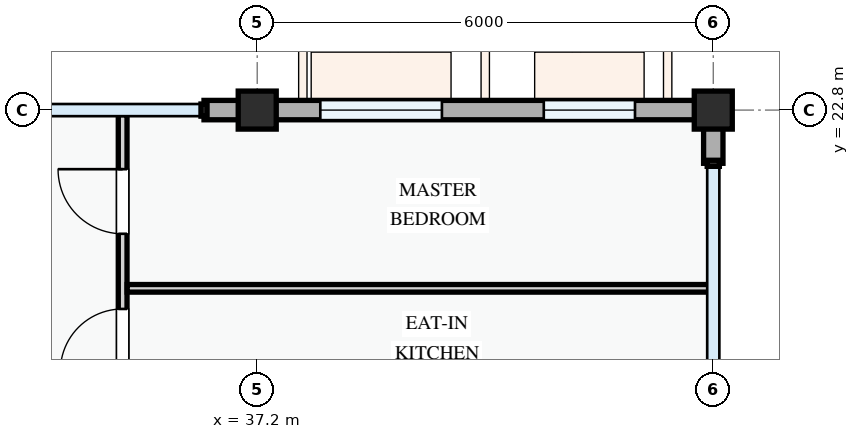
"""IFC4 building model, lengths in metres.
Left out: names, types, materials, properties, quantities, classifications, styles, units other than length and angle.
Written with IfcOpenShell. Run it as: python <this file> out.ifc"""

import sys

from ifc_helpers import new_model, si_unit, direction, frame, frame_2d, origin, origin_2d, place, context, subcontext, project, spatial, rectangle, extrude, element, fill, save


model = new_model("IFC4")
c1 = context("Model", 3, precision=1e-05, world=origin(), true_north=direction((0.0, 1.0)))
c2 = subcontext(c1, "Body", "Model", "MODEL_VIEW")
j1 = project(units=[si_unit("LENGTHUNIT", "METRE"), si_unit("PLANEANGLEUNIT", "RADIAN")], contexts=[c1])
p1 = place(None, origin())
s1 = spatial("IfcSite", under=j1, at=p1, CompositionType="ELEMENT")
p2 = place(p1, origin())
s2 = spatial("IfcBuilding", under=s1, at=p2, CompositionType="ELEMENT")
p3 = place(p2, frame((0.0, 0.0, 31.2)))
s3 = spatial("IfcBuildingStorey", under=s2, at=p3, CompositionType="ELEMENT", Elevation=31.2)
for number, where, z_axis, x_axis in (
    (1, (37.2, 22.8, 0.0), (0.0, 0.0, 1.0), (1.0, 0.0, 0.0)),
    (2, (43.2, 22.8, 0.0), (0.0, 0.0, 1.0), (1.0, 0.0, 0.0)),
):
    element("IfcColumn", number, at=place(p3, frame(where, z_axis=z_axis, x_axis=x_axis)), inside=s3, PredefinedType="COLUMN", context=c2, shape_type="SweptSolid", body=[
        extrude(rectangle(XDim=0.5, YDim=0.5, at=origin_2d()), origin(), (0.0, 0.0, 1.0), 3.3),
    ])
p4 = place(p3, frame((43.2, 22.1, 0.0), z_axis=(0.0, 0.0, 1.0), x_axis=(0.0, 1.0, 0.0)))
e3 = element("IfcWall", 3, at=p4, inside=s3, PredefinedType="STANDARD", context=c2, shape_type="SweptSolid", body=[
    extrude(rectangle(XDim=0.57, YDim=0.255, at=frame_2d((0.285, 0.0))), origin(), (0.0, 0.0, 1.0), 2.425),
])
p5 = place(p3, frame((43.2, 22.8, 0.0), z_axis=(0.0, 0.0, 1.0), x_axis=(-1.0, 0.0, 0.0)))
e4 = element("IfcWall", 4, at=p5, inside=s3, PredefinedType="STANDARD", context=c2, shape_type="SweptSolid", body=[
    extrude(rectangle(XDim=6.0, YDim=0.255, at=frame_2d((3.0, 0.0))), origin(), (0.0, 0.0, 1.0), 2.525),
])
p6 = place(p5, frame((1.03, 0.0, 0.78)))
e5 = element("IfcOpeningElement", 5, at=p6, cuts=e4, PredefinedType="OPENING", context=c2, shape_type="SweptSolid", body=[
    extrude(rectangle(XDim=1.2, YDim=1.5, at=frame_2d((0.6, 0.75))), frame((0.0, 0.137, 0.0), z_axis=(0.0, -1.0, 0.0), x_axis=(1.0, 0.0, 0.0)), (0.0, 0.0, 1.0), 0.275),
])
p7 = place(p5, frame((3.57, 0.0, 0.78)))
e6 = element("IfcOpeningElement", 6, at=p7, cuts=e4, PredefinedType="OPENING", context=c2, shape_type="SweptSolid", body=[
    extrude(rectangle(XDim=1.6, YDim=1.55, at=frame_2d((0.8, 0.775))), frame((0.0, 0.137, 0.0), z_axis=(0.0, -1.0, 0.0), x_axis=(1.0, 0.0, 0.0)), (0.0, 0.0, 1.0), 0.275),
])
p8 = place(p3, frame((37.2, 22.8, 0.0), z_axis=(0.0, 0.0, 1.0), x_axis=(-1.0, 0.0, 0.0)))
e7 = element("IfcWall", 7, at=p8, inside=s3, PredefinedType="STANDARD", context=c2, shape_type="SweptSolid", body=[
    extrude(rectangle(XDim=0.7, YDim=0.255, at=frame_2d((0.35, 0.0))), origin(), (0.0, 0.0, 1.0), 2.375),
])
p9 = place(p3, frame((35.43, 17.98, 0.0), z_axis=(0.0, 0.0, 1.0), x_axis=(0.0, 1.0, 0.0)))
e8 = element("IfcWall", 8, at=p9, inside=s3, PredefinedType="PARTITIONING", context=c2, shape_type="SweptSolid", body=[
    extrude(rectangle(XDim=4.76, YDim=0.115, at=frame_2d((2.38, 0.0))), origin(), (0.0, 0.0, 1.0), 3.0),
])
p10 = place(p9, frame((0.171, 0.0, 0.0)))
e9 = element("IfcOpeningElement", 9, at=p10, cuts=e8, PredefinedType="OPENING", context=c2, shape_type="SweptSolid", body=[
    extrude(rectangle(XDim=0.8, YDim=2.1, at=frame_2d((0.4, 1.05))), frame((0.0, 0.067, 0.0), z_axis=(0.0, -1.0, 0.0), x_axis=(1.0, 0.0, 0.0)), (0.0, 0.0, 1.0), 0.135),
])
p11 = place(p9, frame((1.384, 0.0, 0.0)))
e10 = element("IfcOpeningElement", 10, at=p11, cuts=e8, PredefinedType="OPENING", context=c2, shape_type="SweptSolid", body=[
    extrude(rectangle(XDim=0.82, YDim=2.08, at=frame_2d((0.41, 1.04))), frame((0.0, 0.067, 0.0), z_axis=(0.0, -1.0, 0.0), x_axis=(1.0, 0.0, 0.0)), (0.0, 0.0, 1.0), 0.135),
])
p12 = place(p9, frame((3.193, 0.0, 0.0)))
e11 = element("IfcOpeningElement", 11, at=p12, cuts=e8, PredefinedType="OPENING", context=c2, shape_type="SweptSolid", body=[
    extrude(rectangle(XDim=0.85, YDim=2.1, at=frame_2d((0.425, 1.05))), frame((0.0, 0.067, 0.0), z_axis=(0.0, -1.0, 0.0), x_axis=(1.0, 0.0, 0.0)), (0.0, 0.0, 1.0), 0.135),
])
p13 = place(p3, frame((35.489, 20.455, 0.0), z_axis=(0.0, 0.0, 1.0), x_axis=(1.0, 0.0, 0.0)))
e12 = element("IfcWall", 12, at=p13, inside=s3, PredefinedType="PARTITIONING", context=c2, shape_type="SweptSolid", body=[
    extrude(rectangle(XDim=7.651, YDim=0.1, at=frame_2d((3.825, 0.0))), origin(), (0.0, 0.0, 1.0), 3.0),
])
p14 = place(p6, origin())
e13 = element("IfcWindow", 13, at=p14, inside=s3, PartitioningType="SINGLE_PANEL", PredefinedType="WINDOW", context=c2, shape_type="SweptSolid", body=[
    extrude(rectangle(XDim=1.2, YDim=1.5, at=frame_2d((0.6, 0.75))), frame((0.0, 0.03, 0.0), z_axis=(0.0, -1.0, 0.0), x_axis=(1.0, 0.0, 0.0)), (0.0, 0.0, 1.0), 0.06),
])
fill(e5, e13)
p15 = place(p7, origin())
e14 = element("IfcWindow", 14, at=p15, inside=s3, PartitioningType="DOUBLE_PANEL_VERTICAL", PredefinedType="WINDOW", context=c2, shape_type="SweptSolid", body=[
    extrude(rectangle(XDim=1.6, YDim=1.55, at=frame_2d((0.8, 0.775))), frame((0.0, 0.03, 0.0), z_axis=(0.0, -1.0, 0.0), x_axis=(1.0, 0.0, 0.0)), (0.0, 0.0, 1.0), 0.06),
])
fill(e6, e14)
p16 = place(p11, origin())
e15 = element("IfcDoor", 15, at=p16, inside=s3, OperationType="SINGLE_SWING_LEFT", PredefinedType="DOOR", context=c2, shape_type="SweptSolid", body=[
    extrude(rectangle(XDim=0.82, YDim=2.08, at=frame_2d((0.41, 1.04))), frame((0.0, 0.025, 0.0), z_axis=(0.0, -1.0, 0.0), x_axis=(1.0, 0.0, 0.0)), (0.0, 0.0, 1.0), 0.05),
])
fill(e10, e15)
p17 = place(p12, origin())
e16 = element("IfcDoor", 16, at=p17, inside=s3, OperationType="SINGLE_SWING_RIGHT", PredefinedType="DOOR", context=c2, shape_type="SweptSolid", body=[
    extrude(rectangle(XDim=0.85, YDim=2.1, at=frame_2d((0.425, 1.05))), frame((0.0, 0.025, 0.0), z_axis=(0.0, -1.0, 0.0), x_axis=(1.0, 0.0, 0.0)), (0.0, 0.0, 1.0), 0.05),
])
fill(e11, e16)
save(model, sys.argv[1])
